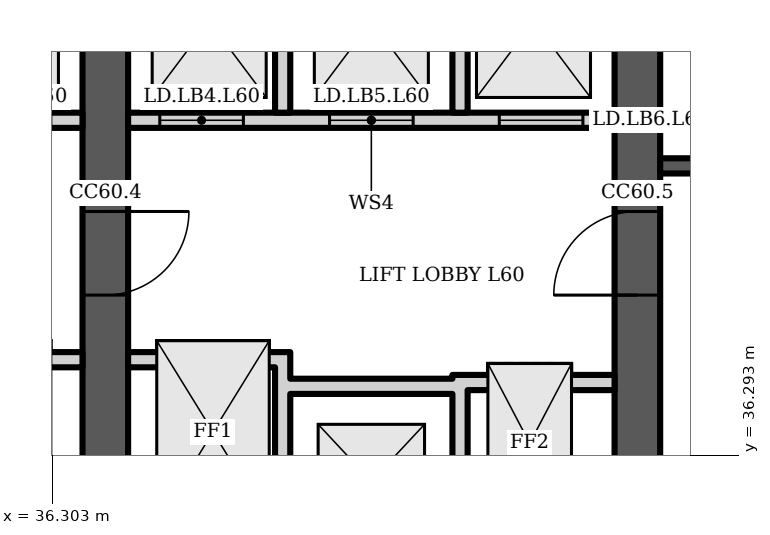
"""IFC4 building model, lengths in metres.
Left out: names, types, materials, properties, quantities, classifications, styles, units other than length and angle.
Written with IfcOpenShell. Run it as: python <this file> out.ifc"""

import sys

from ifc_helpers import new_model, si_unit, direction, frame, frame_2d, origin, place, context, subcontext, project, spatial, polyline, rectangle, outline, extrude, element, fill, save


model = new_model("IFC4")
c1 = context("Model", 3, precision=1e-05, world=origin(), true_north=direction((0.0, 1.0)))
c2 = subcontext(c1, "Body", "Model", "MODEL_VIEW")
j1 = project(units=[si_unit("LENGTHUNIT", "METRE"), si_unit("PLANEANGLEUNIT", "RADIAN")], contexts=[c1])
p1 = place(None, origin())
s1 = spatial("IfcSite", under=j1, at=p1, CompositionType="ELEMENT")
p2 = place(p1, origin())
s2 = spatial("IfcBuilding", under=s1, at=p2, CompositionType="ELEMENT")
p3 = place(p2, frame((0.0, 0.0, 239.5)))
s3 = spatial("IfcBuildingStorey", under=s2, at=p3, CompositionType="ELEMENT", Elevation=239.5)
p4 = place(p3, frame((37.0, 34.6, 0.0), z_axis=(0.0, 0.0, 1.0), x_axis=(0.0, 1.0, 0.0)))
e1 = element("IfcWall", 1, at=p4, inside=s3, PredefinedType="SHEAR", context=c2, shape_type="SweptSolid", body=[
    extrude(rectangle(XDim=14.784, YDim=0.6, at=frame_2d((7.392, 0.0))), origin(), (0.0, 0.0, 1.0), 3.6),
])
p5 = place(p4, frame((11.302, 0.0, 0.0)))
e2 = element("IfcOpeningElement", 2, at=p5, cuts=e1, PredefinedType="OPENING", context=c2, shape_type="SweptSolid", body=[
    extrude(rectangle(XDim=1.0, YDim=2.1, at=frame_2d((0.5, 1.05))), frame((0.0, 0.31, 0.0), z_axis=(0.0, -1.0, 0.0), x_axis=(1.0, 0.0, 0.0)), (0.0, 0.0, 1.0), 0.62),
])
p6 = place(p4, frame((3.8, 0.0, 0.0)))
e3 = element("IfcOpeningElement", 3, at=p6, cuts=e1, PredefinedType="OPENING", context=c2, shape_type="SweptSolid", body=[
    extrude(rectangle(XDim=1.1, YDim=2.1, at=frame_2d((0.55, 1.05))), frame((0.0, 0.31, 0.0), z_axis=(0.0, -1.0, 0.0), x_axis=(1.0, 0.0, 0.0)), (0.0, 0.0, 1.0), 0.62),
])
p7 = place(p3, frame((44.0, 34.6, 0.0), z_axis=(0.0, 0.0, 1.0), x_axis=(0.0, 1.0, 0.0)))
e4 = element("IfcWall", 4, at=p7, inside=s3, PredefinedType="SHEAR", context=c2, shape_type="SweptSolid", body=[
    extrude(rectangle(XDim=14.784, YDim=0.6, at=frame_2d((7.392, 0.0))), origin(), (0.0, 0.0, 1.0), 3.6),
])
p8 = place(p7, frame((11.608, 0.0, 0.0)))
e5 = element("IfcOpeningElement", 5, at=p8, cuts=e4, PredefinedType="OPENING", context=c2, shape_type="SweptSolid", body=[
    extrude(rectangle(XDim=1.0, YDim=2.1, at=frame_2d((0.5, 1.05))), frame((0.0, 0.31, 0.0), z_axis=(0.0, -1.0, 0.0), x_axis=(1.0, 0.0, 0.0)), (0.0, 0.0, 1.0), 0.62),
])
p9 = place(p7, frame((3.8, 0.0, 0.0)))
e6 = element("IfcOpeningElement", 6, at=p9, cuts=e4, PredefinedType="OPENING", context=c2, shape_type="SweptSolid", body=[
    extrude(rectangle(XDim=1.1, YDim=2.1, at=frame_2d((0.55, 1.05))), frame((0.0, 0.31, 0.0), z_axis=(0.0, -1.0, 0.0), x_axis=(1.0, 0.0, 0.0)), (0.0, 0.0, 1.0), 0.62),
])
p10 = place(p3, frame((30.3, 40.7, 0.0), z_axis=(0.0, 0.0, 1.0), x_axis=(1.0, 0.0, 0.0)))
e7 = element("IfcWall", 7, at=p10, inside=s3, PredefinedType="PARTITIONING", context=c2, shape_type="SweptSolid", body=[
    extrude(rectangle(XDim=6.4, YDim=0.2, at=frame_2d((3.2, 0.0))), origin(), (0.0, 0.0, 1.0), 3.2),
])
p11 = place(p10, frame((0.417, 0.0, 0.0)))
e8 = element("IfcOpeningElement", 8, at=p11, cuts=e7, PredefinedType="OPENING", context=c2, shape_type="SweptSolid", body=[
    extrude(rectangle(XDim=1.1, YDim=2.1, at=frame_2d((0.55, 1.05))), frame((0.0, 0.11, 0.0), z_axis=(0.0, -1.0, 0.0), x_axis=(1.0, 0.0, 0.0)), (0.0, 0.0, 1.0), 0.22),
])
p12 = place(p10, frame((2.65, 0.0, 0.0)))
e9 = element("IfcOpeningElement", 9, at=p12, cuts=e7, PredefinedType="OPENING", context=c2, shape_type="SweptSolid", body=[
    extrude(rectangle(XDim=1.1, YDim=2.1, at=frame_2d((0.55, 1.05))), frame((0.0, 0.11, 0.0), z_axis=(0.0, -1.0, 0.0), x_axis=(1.0, 0.0, 0.0)), (0.0, 0.0, 1.0), 0.22),
])
p13 = place(p10, frame((4.883, 0.0, 0.0)))
e10 = element("IfcOpeningElement", 10, at=p13, cuts=e7, PredefinedType="OPENING", context=c2, shape_type="SweptSolid", body=[
    extrude(rectangle(XDim=1.1, YDim=2.1, at=frame_2d((0.55, 1.05))), frame((0.0, 0.11, 0.0), z_axis=(0.0, -1.0, 0.0), x_axis=(1.0, 0.0, 0.0)), (0.0, 0.0, 1.0), 0.22),
])
p14 = place(p3, frame((0.0, 0.0, -0.0)))
e11 = element("IfcWall", 11, at=p14, inside=s3, PredefinedType="PARTITIONING", context=c2, shape_type="SweptSolid", body=[
    extrude(outline(polyline([(34.567, 37.65), (34.767, 37.65), (36.7, 37.65), (36.7, 37.45), (34.767, 37.45), (34.767, 34.6), (34.567, 34.6), (34.567, 37.65)])), origin(), (0.0, 0.0, 1.0), 3.2),
])
p15 = place(p3, frame((0.0, 0.0, -0.0)))
e12 = element("IfcWall", 12, at=p15, inside=s3, PredefinedType="PARTITIONING", context=c2, shape_type="SweptSolid", body=[
    extrude(outline(polyline([(32.433, 40.8), (32.233, 40.8), (32.233, 43.8), (30.3, 43.8), (30.3, 44.0), (36.7, 44.0), (36.7, 43.8), (34.767, 43.8), (34.767, 40.8), (34.567, 40.8), (34.567, 43.8), (32.433, 43.8), (32.433, 40.8)])), origin(), (0.0, 0.0, 1.0), 3.2),
])
p16 = place(p3, frame((37.3, 40.7, 0.0), z_axis=(0.0, 0.0, 1.0), x_axis=(1.0, 0.0, 0.0)))
e13 = element("IfcWall", 13, at=p16, inside=s3, PredefinedType="PARTITIONING", context=c2, shape_type="SweptSolid", body=[
    extrude(rectangle(XDim=6.4, YDim=0.2, at=frame_2d((3.2, 0.0))), origin(), (0.0, 0.0, 1.0), 3.2),
])
p17 = place(p16, frame((0.417, 0.0, 0.0)))
e14 = element("IfcOpeningElement", 14, at=p17, cuts=e13, PredefinedType="OPENING", context=c2, shape_type="SweptSolid", body=[
    extrude(rectangle(XDim=1.1, YDim=2.1, at=frame_2d((0.55, 1.05))), frame((0.0, 0.11, 0.0), z_axis=(0.0, -1.0, 0.0), x_axis=(1.0, 0.0, 0.0)), (0.0, 0.0, 1.0), 0.22),
])
p18 = place(p16, frame((2.65, 0.0, 0.0)))
e15 = element("IfcOpeningElement", 15, at=p18, cuts=e13, PredefinedType="OPENING", context=c2, shape_type="SweptSolid", body=[
    extrude(rectangle(XDim=1.1, YDim=2.1, at=frame_2d((0.55, 1.05))), frame((0.0, 0.11, 0.0), z_axis=(0.0, -1.0, 0.0), x_axis=(1.0, 0.0, 0.0)), (0.0, 0.0, 1.0), 0.22),
])
p19 = place(p16, frame((4.883, 0.0, 0.0)))
e16 = element("IfcOpeningElement", 16, at=p19, cuts=e13, PredefinedType="OPENING", context=c2, shape_type="SweptSolid", body=[
    extrude(rectangle(XDim=1.1, YDim=2.1, at=frame_2d((0.55, 1.05))), frame((0.0, 0.11, 0.0), z_axis=(0.0, -1.0, 0.0), x_axis=(1.0, 0.0, 0.0)), (0.0, 0.0, 1.0), 0.22),
])
p20 = place(p3, frame((0.0, 0.0, -0.0)))
e17 = element("IfcWall", 17, at=p20, inside=s3, PredefinedType="PARTITIONING", context=c2, shape_type="SweptSolid", body=[
    extrude(outline(polyline([(41.567, 37.1), (39.433, 37.1), (39.433, 34.6), (39.233, 34.6), (39.233, 37.45), (37.3, 37.45), (37.3, 37.65), (39.233, 37.65), (39.433, 37.65), (39.433, 37.3), (41.567, 37.3), (41.567, 37.35), (41.767, 37.35), (43.7, 37.35), (43.7, 37.15), (41.767, 37.15), (41.767, 34.6), (41.567, 34.6), (41.567, 37.1)])), origin(), (0.0, 0.0, 1.0), 3.2),
])
p21 = place(p3, frame((0.0, 0.0, -0.0)))
e18 = element("IfcWall", 18, at=p21, inside=s3, PredefinedType="PARTITIONING", context=c2, shape_type="SweptSolid", body=[
    extrude(outline(polyline([(39.433, 40.8), (39.233, 40.8), (39.233, 43.8), (37.3, 43.8), (37.3, 44.0), (43.7, 44.0), (43.7, 43.8), (41.767, 43.8), (41.767, 40.8), (41.567, 40.8), (41.567, 43.8), (39.433, 43.8), (39.433, 40.8)])), origin(), (0.0, 0.0, 1.0), 3.2),
])
p22 = place(p3, frame((44.3, 40.1, 0.0), z_axis=(0.0, 0.0, 1.0), x_axis=(1.0, 0.0, 0.0)))
e19 = element("IfcWall", 19, at=p22, inside=s3, PredefinedType="SHEAR", context=c2, shape_type="SweptSolid", body=[
    extrude(rectangle(XDim=6.4, YDim=0.2, at=frame_2d((3.2, 0.0))), origin(), (0.0, 0.0, 1.0), 3.2),
])
p23 = place(p22, frame((3.625, 0.0, 0.0)))
e20 = element("IfcOpeningElement", 20, at=p23, cuts=e19, PredefinedType="OPENING", context=c2, shape_type="SweptSolid", body=[
    extrude(rectangle(XDim=1.2, YDim=2.1, at=frame_2d((0.6, 1.05))), frame((0.0, 0.11, 0.0), z_axis=(0.0, -1.0, 0.0), x_axis=(1.0, 0.0, 0.0)), (0.0, 0.0, 1.0), 0.22),
])
p24 = place(p22, frame((0.625, 0.0, 0.0)))
e21 = element("IfcOpeningElement", 21, at=p24, cuts=e19, PredefinedType="OPENING", context=c2, shape_type="SweptSolid", body=[
    extrude(rectangle(XDim=0.9, YDim=2.1, at=frame_2d((0.45, 1.05))), frame((0.0, 0.11, 0.0), z_axis=(0.0, -1.0, 0.0), x_axis=(1.0, 0.0, 0.0)), (0.0, 0.0, 1.0), 0.22),
])
p25 = place(p17, origin())
e22 = element("IfcDoor", 22, at=p25, inside=s3, OperationType="DOUBLE_DOOR_SLIDING", PredefinedType="DOOR", context=c2, shape_type="SweptSolid", body=[
    extrude(rectangle(XDim=1.1, YDim=2.1, at=frame_2d((0.55, 1.05))), frame((0.0, 0.025, 0.0), z_axis=(0.0, -1.0, 0.0), x_axis=(1.0, 0.0, 0.0)), (0.0, 0.0, 1.0), 0.05),
])
fill(e14, e22)
p26 = place(p18, origin())
e23 = element("IfcDoor", 23, at=p26, inside=s3, OperationType="DOUBLE_DOOR_SLIDING", PredefinedType="DOOR", context=c2, shape_type="SweptSolid", body=[
    extrude(rectangle(XDim=1.1, YDim=2.1, at=frame_2d((0.55, 1.05))), frame((0.0, 0.025, 0.0), z_axis=(0.0, -1.0, 0.0), x_axis=(1.0, 0.0, 0.0)), (0.0, 0.0, 1.0), 0.05),
])
fill(e15, e23)
p27 = place(p19, origin())
e24 = element("IfcDoor", 24, at=p27, inside=s3, OperationType="DOUBLE_DOOR_SLIDING", PredefinedType="DOOR", context=c2, shape_type="SweptSolid", body=[
    extrude(rectangle(XDim=1.1, YDim=2.1, at=frame_2d((0.55, 1.05))), frame((0.0, 0.025, 0.0), z_axis=(0.0, -1.0, 0.0), x_axis=(1.0, 0.0, 0.0)), (0.0, 0.0, 1.0), 0.05),
])
fill(e16, e24)
p28 = place(p6, origin())
e25 = element("IfcDoor", 25, at=p28, inside=s3, OperationType="SINGLE_SWING_RIGHT", PredefinedType="DOOR", context=c2, shape_type="SweptSolid", body=[
    extrude(rectangle(XDim=1.1, YDim=2.1, at=frame_2d((0.55, 1.05))), frame((0.0, 0.025, 0.0), z_axis=(0.0, -1.0, 0.0), x_axis=(1.0, 0.0, 0.0)), (0.0, 0.0, 1.0), 0.05),
])
fill(e3, e25)
p29 = place(p9, origin())
e26 = element("IfcDoor", 26, at=p29, inside=s3, OperationType="SINGLE_SWING_LEFT", PredefinedType="DOOR", context=c2, shape_type="SweptSolid", body=[
    extrude(rectangle(XDim=1.1, YDim=2.1, at=frame_2d((0.55, 1.05))), frame((0.0, 0.025, 0.0), z_axis=(0.0, -1.0, 0.0), x_axis=(1.0, 0.0, 0.0)), (0.0, 0.0, 1.0), 0.05),
])
fill(e6, e26)
save(model, sys.argv[1])
